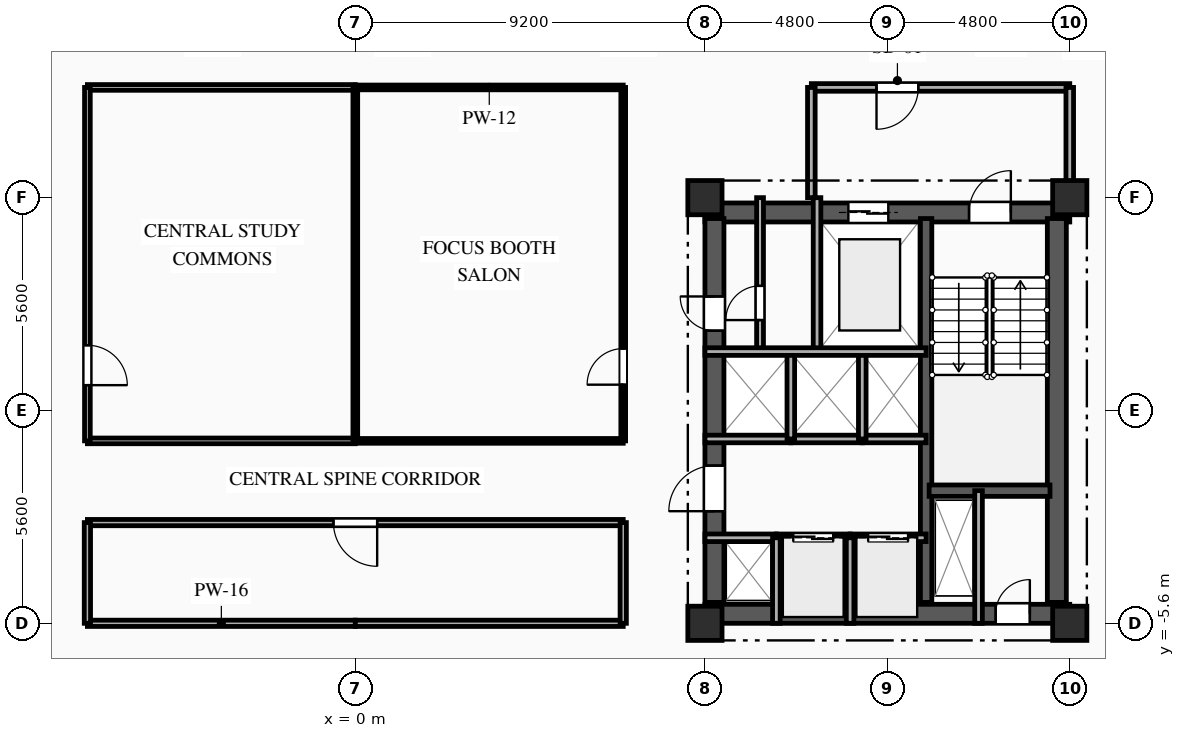
"""IFC4 building model, lengths in metres.
Left out: names, types, materials, properties, quantities, classifications, styles, units other than length and angle.
Written with IfcOpenShell. Run it as: python <this file> out.ifc"""

import sys

from ifc_helpers import new_model, si_unit, direction, frame, frame_2d, origin, origin_2d, place, context, subcontext, project, spatial, rectangle, extrude, element, fill, save


model = new_model("IFC4")
c1 = context("Model", 3, precision=1e-05, world=origin(), true_north=direction((0.0, 1.0)))
c2 = subcontext(c1, "Body", "Model", "MODEL_VIEW")
j1 = project(units=[si_unit("LENGTHUNIT", "METRE"), si_unit("PLANEANGLEUNIT", "RADIAN")], contexts=[c1])
p1 = place(None, origin())
s1 = spatial("IfcSite", under=j1, at=p1, CompositionType="ELEMENT")
p2 = place(p1, origin())
s2 = spatial("IfcBuilding", under=s1, at=p2, CompositionType="ELEMENT")
p3 = place(p2, frame((0.0, 0.0, 137.7)))
s3 = spatial("IfcBuildingStorey", under=s2, at=p3, CompositionType="ELEMENT", Elevation=137.7)
for number, where, z_axis, x_axis in (
    (1, (9.2, -5.6, 0.0), (0.0, 0.0, 1.0), (1.0, 0.0, 0.0)),
    (2, (9.2, 5.6, 0.0), (0.0, 0.0, 1.0), (1.0, 0.0, 0.0)),
    (3, (18.8, -5.6, 0.0), (0.0, 0.0, 1.0), (1.0, 0.0, 0.0)),
    (4, (18.8, 5.6, 0.0), (0.0, 0.0, 1.0), (1.0, 0.0, 0.0)),
):
    element("IfcColumn", number, at=place(p3, frame(where, z_axis=z_axis, x_axis=x_axis)), inside=s3, PredefinedType="COLUMN", context=c2, shape_type="SweptSolid", body=[
        extrude(rectangle(XDim=0.9, YDim=0.9, at=origin_2d()), origin(), (0.0, 0.0, 1.0), 3.35),
    ])
p4 = place(p3, frame((9.2, 5.21, 0.0), z_axis=(0.0, 0.0, 1.0), x_axis=(1.0, 0.0, 0.0)))
e5 = element("IfcWall", 5, at=p4, inside=s3, PredefinedType="SHEAR", context=c2, shape_type="SweptSolid", body=[
    extrude(rectangle(XDim=9.6, YDim=0.5, at=frame_2d((4.8, 0.0))), origin(), (0.0, 0.0, 1.0), 3.04),
])
p5 = place(p4, frame((6.95, 0.0, 0.0)))
e6 = element("IfcOpeningElement", 6, at=p5, cuts=e5, PredefinedType="OPENING", context=c2, shape_type="SweptSolid", body=[
    extrude(rectangle(XDim=1.1, YDim=2.15, at=frame_2d((0.55, 1.075))), frame((0.0, 0.26, 0.0), z_axis=(0.0, -1.0, 0.0), x_axis=(1.0, 0.0, 0.0)), (0.0, 0.0, 1.0), 0.52),
])
p6 = place(p4, frame((3.775, 0.0, 0.0)))
e7 = element("IfcOpeningElement", 7, at=p6, cuts=e5, PredefinedType="OPENING", context=c2, shape_type="SweptSolid", body=[
    extrude(rectangle(XDim=1.05, YDim=2.1, at=frame_2d((0.525, 1.05))), frame((0.0, 0.26, 0.0), z_axis=(0.0, -1.0, 0.0), x_axis=(1.0, 0.0, 0.0)), (0.0, 0.0, 1.0), 0.52),
])
p7 = place(p3, frame((9.2, -5.35, 0.0), z_axis=(0.0, 0.0, 1.0), x_axis=(1.0, 0.0, 0.0)))
e8 = element("IfcWall", 8, at=p7, inside=s3, PredefinedType="SHEAR", context=c2, shape_type="SweptSolid", body=[
    extrude(rectangle(XDim=9.6, YDim=0.5, at=frame_2d((4.8, 0.0))), origin(), (0.0, 0.0, 1.0), 3.04),
])
p8 = place(p7, frame((7.65, 0.0, 0.0)))
e9 = element("IfcOpeningElement", 9, at=p8, cuts=e8, PredefinedType="OPENING", context=c2, shape_type="SweptSolid", body=[
    extrude(rectangle(XDim=0.9, YDim=2.1, at=frame_2d((0.45, 1.05))), frame((0.0, 0.26, 0.0), z_axis=(0.0, -1.0, 0.0), x_axis=(1.0, 0.0, 0.0)), (0.0, 0.0, 1.0), 0.52),
])
p9 = place(p3, frame((9.45, -5.05, 0.0), z_axis=(0.0, 0.0, 1.0), x_axis=(0.0, 1.0, 0.0)))
e10 = element("IfcWall", 10, at=p9, inside=s3, PredefinedType="SHEAR", context=c2, shape_type="SweptSolid", body=[
    extrude(rectangle(XDim=10.1, YDim=0.5, at=frame_2d((5.05, 0.0))), origin(), (0.0, 0.0, 1.0), 3.04),
])
p10 = place(p9, frame((7.15, 0.0, 0.0)))
e11 = element("IfcOpeningElement", 11, at=p10, cuts=e10, PredefinedType="OPENING", context=c2, shape_type="SweptSolid", body=[
    extrude(rectangle(XDim=0.9, YDim=2.1, at=frame_2d((0.45, 1.05))), frame((0.0, 0.26, 0.0), z_axis=(0.0, -1.0, 0.0), x_axis=(1.0, 0.0, 0.0)), (0.0, 0.0, 1.0), 0.52),
])
p11 = place(p9, frame((2.4, 0.0, 0.0)))
e12 = element("IfcOpeningElement", 12, at=p11, cuts=e10, PredefinedType="OPENING", context=c2, shape_type="SweptSolid", body=[
    extrude(rectangle(XDim=1.2, YDim=2.15, at=frame_2d((0.6, 1.075))), frame((0.0, 0.26, 0.0), z_axis=(0.0, -1.0, 0.0), x_axis=(1.0, 0.0, 0.0)), (0.0, 0.0, 1.0), 0.52),
])
p12 = place(p3, frame((18.46, -5.05, 0.0), z_axis=(0.0, 0.0, 1.0), x_axis=(0.0, 1.0, 0.0)))
e13 = element("IfcWall", 13, at=p12, inside=s3, PredefinedType="SHEAR", context=c2, shape_type="SweptSolid", body=[
    extrude(rectangle(XDim=10.1, YDim=0.5, at=frame_2d((5.05, 0.0))), origin(), (0.0, 0.0, 1.0), 3.04),
])
p13 = place(p3, frame((15.02, -5.05, 0.0), z_axis=(0.0, 0.0, 1.0), x_axis=(0.0, 1.0, 0.0)))
e14 = element("IfcWall", 14, at=p13, inside=s3, PredefinedType="SHEAR", context=c2, shape_type="SweptSolid", body=[
    extrude(rectangle(XDim=10.1, YDim=0.3, at=frame_2d((5.05, 0.0))), origin(), (0.0, 0.0, 1.0), 3.04),
])
p14 = place(p3, frame((15.1, -2.11, 0.0), z_axis=(0.0, 0.0, 1.0), x_axis=(1.0, 0.0, 0.0)))
e15 = element("IfcWall", 15, at=p14, inside=s3, PredefinedType="SHEAR", context=c2, shape_type="SweptSolid", body=[
    extrude(rectangle(XDim=3.18, YDim=0.3, at=frame_2d((1.59, 0.0))), origin(), (0.0, 0.0, 1.0), 3.04),
])
p15 = place(p3, frame((16.4, -2.11, 0.0), z_axis=(0.0, 0.0, 1.0), x_axis=(0.0, -1.0, 0.0)))
e16 = element("IfcWall", 16, at=p15, inside=s3, PredefinedType="PARTITIONING", context=c2, shape_type="SweptSolid", body=[
    extrude(rectangle(XDim=3.49, YDim=0.2, at=frame_2d((1.745, 0.0))), origin(), (0.0, 0.0, 1.0), 3.04),
])
p16 = place(p3, frame((12.15, 5.6, 0.0), z_axis=(0.0, 0.0, 1.0), x_axis=(0.0, -1.0, 0.0)))
e17 = element("IfcWall", 17, at=p16, inside=s3, PredefinedType="PARTITIONING", context=c2, shape_type="SweptSolid", body=[
    extrude(rectangle(XDim=4.05, YDim=0.2, at=frame_2d((2.025, 0.0))), origin(), (0.0, 0.0, 1.0), 3.04),
])
p17 = place(p3, frame((18.8, 8.5, 0.0), z_axis=(0.0, 0.0, 1.0), x_axis=(-1.0, 0.0, 0.0)))
e18 = element("IfcWall", 18, at=p17, inside=s3, PredefinedType="PARTITIONING", context=c2, shape_type="SweptSolid", body=[
    extrude(rectangle(XDim=6.8, YDim=0.2, at=frame_2d((3.4, 0.0))), origin(), (0.0, 0.0, 1.0), 3.04),
])
p18 = place(p17, frame((3.985, 0.0, 0.0)))
e19 = element("IfcOpeningElement", 19, at=p18, cuts=e18, PredefinedType="OPENING", context=c2, shape_type="SweptSolid", body=[
    extrude(rectangle(XDim=1.1, YDim=2.15, at=frame_2d((0.55, 1.075))), frame((0.0, 0.11, 0.0), z_axis=(0.0, -1.0, 0.0), x_axis=(1.0, 0.0, 0.0)), (0.0, 0.0, 1.0), 0.22),
])
p19 = place(p3, frame((18.8, 5.6, 0.0), z_axis=(0.0, 0.0, 1.0), x_axis=(0.0, 1.0, 0.0)))
e20 = element("IfcWall", 20, at=p19, inside=s3, PredefinedType="PARTITIONING", context=c2, shape_type="SweptSolid", body=[
    extrude(rectangle(XDim=2.9, YDim=0.2, at=frame_2d((1.45, 0.0))), origin(), (0.0, 0.0, 1.0), 2.525),
])
p20 = place(p3, frame((12.0, 8.5, 0.0), z_axis=(0.0, 0.0, 1.0), x_axis=(0.0, -1.0, 0.0)))
e21 = element("IfcWall", 21, at=p20, inside=s3, PredefinedType="PARTITIONING", context=c2, shape_type="SweptSolid", body=[
    extrude(rectangle(XDim=2.9, YDim=0.2, at=frame_2d((1.45, 0.0))), origin(), (0.0, 0.0, 1.0), 3.04),
])
p21 = place(p3, frame((10.65, 1.55, 0.0), z_axis=(0.0, 0.0, 1.0), x_axis=(0.0, 1.0, 0.0)))
e22 = element("IfcWall", 22, at=p21, inside=s3, PredefinedType="PARTITIONING", context=c2, shape_type="SweptSolid", body=[
    extrude(rectangle(XDim=4.05, YDim=0.18, at=frame_2d((2.025, 0.0))), origin(), (0.0, 0.0, 1.0), 3.04),
])
p22 = place(p21, frame((0.829, 0.0, 0.0)))
e23 = element("IfcOpeningElement", 23, at=p22, cuts=e22, PredefinedType="OPENING", context=c2, shape_type="SweptSolid", body=[
    extrude(rectangle(XDim=0.9, YDim=2.1, at=frame_2d((0.45, 1.05))), frame((0.0, 0.1, 0.0), z_axis=(0.0, -1.0, 0.0), x_axis=(1.0, 0.0, 0.0)), (0.0, 0.0, 1.0), 0.2),
])
p23 = place(p3, frame((9.2, -3.35, 0.0), z_axis=(0.0, 0.0, 1.0), x_axis=(1.0, 0.0, 0.0)))
e24 = element("IfcWall", 24, at=p23, inside=s3, PredefinedType="PARTITIONING", context=c2, shape_type="SweptSolid", body=[
    extrude(rectangle(XDim=1.88, YDim=0.2, at=frame_2d((0.94, 0.0))), origin(), (0.0, 0.0, 1.0), 2.755),
])
p24 = place(p3, frame((11.08, -3.35, 0.0), z_axis=(0.0, 0.0, 1.0), x_axis=(1.0, 0.0, 0.0)))
e25 = element("IfcWall", 25, at=p24, inside=s3, PredefinedType="PARTITIONING", context=c2, shape_type="SweptSolid", body=[
    extrude(rectangle(XDim=1.94, YDim=0.2, at=frame_2d((0.97, 0.0))), origin(), (0.0, 0.0, 1.0), 3.04),
])
p25 = place(p24, frame((0.445, 0.0, 0.0)))
e26 = element("IfcOpeningElement", 26, at=p25, cuts=e25, PredefinedType="OPENING", context=c2, shape_type="SweptSolid", body=[
    extrude(rectangle(XDim=1.05, YDim=2.1, at=frame_2d((0.525, 1.05))), frame((0.0, 0.11, 0.0), z_axis=(0.0, -1.0, 0.0), x_axis=(1.0, 0.0, 0.0)), (0.0, 0.0, 1.0), 0.22),
])
p26 = place(p3, frame((13.02, -3.35, 0.0), z_axis=(0.0, 0.0, 1.0), x_axis=(1.0, 0.0, 0.0)))
e27 = element("IfcWall", 27, at=p26, inside=s3, PredefinedType="PARTITIONING", context=c2, shape_type="SweptSolid", body=[
    extrude(rectangle(XDim=2.0, YDim=0.2, at=frame_2d((1.0, 0.0))), origin(), (0.0, 0.0, 1.0), 3.04),
])
p27 = place(p26, frame((0.475, 0.0, 0.0)))
e28 = element("IfcOpeningElement", 28, at=p27, cuts=e27, PredefinedType="OPENING", context=c2, shape_type="SweptSolid", body=[
    extrude(rectangle(XDim=1.05, YDim=2.1, at=frame_2d((0.525, 1.05))), frame((0.0, 0.11, 0.0), z_axis=(0.0, -1.0, 0.0), x_axis=(1.0, 0.0, 0.0)), (0.0, 0.0, 1.0), 0.22),
])
p28 = place(p3, frame((11.46, -0.75, 0.0), z_axis=(0.0, 0.0, 1.0), x_axis=(-1.0, 0.0, 0.0)))
e29 = element("IfcWall", 29, at=p28, inside=s3, PredefinedType="PARTITIONING", context=c2, shape_type="SweptSolid", body=[
    extrude(rectangle(XDim=2.26, YDim=0.2, at=frame_2d((1.13, 0.0))), origin(), (0.0, 0.0, 1.0), 3.04),
])
p29 = place(p3, frame((13.34, -0.75, 0.0), z_axis=(0.0, 0.0, 1.0), x_axis=(-1.0, 0.0, 0.0)))
e30 = element("IfcWall", 30, at=p29, inside=s3, PredefinedType="PARTITIONING", context=c2, shape_type="SweptSolid", body=[
    extrude(rectangle(XDim=1.88, YDim=0.2, at=frame_2d((0.94, 0.0))), origin(), (0.0, 0.0, 1.0), 3.04),
])
p30 = place(p3, frame((15.02, -0.75, 0.0), z_axis=(0.0, 0.0, 1.0), x_axis=(-1.0, 0.0, 0.0)))
e31 = element("IfcWall", 31, at=p30, inside=s3, PredefinedType="PARTITIONING", context=c2, shape_type="SweptSolid", body=[
    extrude(rectangle(XDim=1.68, YDim=0.2, at=frame_2d((0.84, 0.0))), origin(), (0.0, 0.0, 1.0), 3.04),
])
for number, where, z_axis, x_axis in (
    (32, (11.08, -5.6, 0.0), (0.0, 0.0, 1.0), (0.0, 1.0, 0.0)),
    (33, (13.02, -5.6, 0.0), (0.0, 0.0, 1.0), (0.0, 1.0, 0.0)),
):
    element("IfcWall", number, at=place(p3, frame(where, z_axis=z_axis, x_axis=x_axis)), inside=s3, PredefinedType="PARTITIONING", context=c2, shape_type="SweptSolid", body=[
        extrude(rectangle(XDim=2.25, YDim=0.2, at=frame_2d((1.125, 0.0))), origin(), (0.0, 0.0, 1.0), 3.04),
    ])
for number, where, z_axis, x_axis in (
    (34, (11.46, -0.75, 0.0), (0.0, 0.0, 1.0), (0.0, 1.0, 0.0)),
    (35, (13.34, -0.75, 0.0), (0.0, 0.0, 1.0), (0.0, 1.0, 0.0)),
):
    element("IfcWall", number, at=place(p3, frame(where, z_axis=z_axis, x_axis=x_axis)), inside=s3, PredefinedType="PARTITIONING", context=c2, shape_type="SweptSolid", body=[
        extrude(rectangle(XDim=2.3, YDim=0.2, at=frame_2d((1.15, 0.0))), origin(), (0.0, 0.0, 1.0), 3.04),
    ])
p31 = place(p3, frame((0.0, 8.5, 0.0), z_axis=(0.0, 0.0, 1.0), x_axis=(-1.0, 0.0, 0.0)))
e36 = element("IfcWall", 36, at=p31, inside=s3, PredefinedType="PARTITIONING", context=c2, shape_type="SweptSolid", body=[
    extrude(rectangle(XDim=7.05, YDim=0.15, at=frame_2d((3.525, 0.0))), origin(), (0.0, 0.0, 1.0), 3.04),
])
p32 = place(p3, frame((7.05, 8.5, 0.0), z_axis=(0.0, 0.0, 1.0), x_axis=(-1.0, 0.0, 0.0)))
e37 = element("IfcWall", 37, at=p32, inside=s3, PredefinedType="PARTITIONING", context=c2, shape_type="SweptSolid", body=[
    extrude(rectangle(XDim=7.05, YDim=0.125, at=frame_2d((3.525, 0.0))), origin(), (0.0, 0.0, 1.0), 3.04),
])
for number, where, z_axis, x_axis in (
    (38, (-7.05, -5.6, 0.0), (0.0, 0.0, 1.0), (1.0, 0.0, 0.0)),
    (39, (0.0, -5.6, 0.0), (0.0, 0.0, 1.0), (1.0, 0.0, 0.0)),
):
    element("IfcWall", number, at=place(p3, frame(where, z_axis=z_axis, x_axis=x_axis)), inside=s3, PredefinedType="PARTITIONING", context=c2, shape_type="SweptSolid", body=[
        extrude(rectangle(XDim=7.05, YDim=0.165, at=frame_2d((3.525, 0.0))), origin(), (0.0, 0.0, 1.0), 2.525),
    ])
p33 = place(p3, frame((-7.05, -0.8, 0.0), z_axis=(0.0, 0.0, 1.0), x_axis=(1.0, 0.0, 0.0)))
e40 = element("IfcWall", 40, at=p33, inside=s3, PredefinedType="PARTITIONING", context=c2, shape_type="SweptSolid", body=[
    extrude(rectangle(XDim=7.05, YDim=0.15, at=frame_2d((3.525, 0.0))), origin(), (0.0, 0.0, 1.0), 3.04),
])
p34 = place(p3, frame((0.0, -0.8, 0.0), z_axis=(0.0, 0.0, 1.0), x_axis=(1.0, 0.0, 0.0)))
e41 = element("IfcWall", 41, at=p34, inside=s3, PredefinedType="PARTITIONING", context=c2, shape_type="SweptSolid", body=[
    extrude(rectangle(XDim=7.05, YDim=0.125, at=frame_2d((3.525, 0.0))), origin(), (0.0, 0.0, 1.0), 3.04),
])
p35 = place(p3, frame((7.05, -2.95, 0.0), z_axis=(0.0, 0.0, 1.0), x_axis=(-1.0, 0.0, 0.0)))
e42 = element("IfcWall", 42, at=p35, inside=s3, PredefinedType="PARTITIONING", context=c2, shape_type="SweptSolid", body=[
    extrude(rectangle(XDim=14.1, YDim=0.165, at=frame_2d((7.05, 0.0))), origin(), (0.0, 0.0, 1.0), 3.04),
])
p36 = place(p35, frame((6.475, 0.0, 0.0)))
e43 = element("IfcOpeningElement", 43, at=p36, cuts=e42, PredefinedType="OPENING", context=c2, shape_type="SweptSolid", body=[
    extrude(rectangle(XDim=1.15, YDim=2.15, at=frame_2d((0.575, 1.075))), frame((0.0, 0.093, 0.0), z_axis=(0.0, -1.0, 0.0), x_axis=(1.0, 0.0, 0.0)), (0.0, 0.0, 1.0), 0.185),
])
p37 = place(p3, frame((-7.05, 8.5, 0.0), z_axis=(0.0, 0.0, 1.0), x_axis=(0.0, -1.0, 0.0)))
e44 = element("IfcWall", 44, at=p37, inside=s3, PredefinedType="PARTITIONING", context=c2, shape_type="SweptSolid", body=[
    extrude(rectangle(XDim=9.3, YDim=0.15, at=frame_2d((4.65, 0.0))), origin(), (0.0, 0.0, 1.0), 3.04),
])
p38 = place(p37, frame((6.784, 0.0, 0.0)))
e45 = element("IfcOpeningElement", 45, at=p38, cuts=e44, PredefinedType="OPENING", context=c2, shape_type="SweptSolid", body=[
    extrude(rectangle(XDim=1.05, YDim=2.15, at=frame_2d((0.525, 1.075))), frame((0.0, 0.085, 0.0), z_axis=(0.0, -1.0, 0.0), x_axis=(1.0, 0.0, 0.0)), (0.0, 0.0, 1.0), 0.17),
])
p39 = place(p3, frame((-7.05, -2.95, 0.0), z_axis=(0.0, 0.0, 1.0), x_axis=(0.0, -1.0, 0.0)))
e46 = element("IfcWall", 46, at=p39, inside=s3, PredefinedType="PARTITIONING", context=c2, shape_type="SweptSolid", body=[
    extrude(rectangle(XDim=2.65, YDim=0.165, at=frame_2d((1.325, 0.0))), origin(), (0.0, 0.0, 1.0), 3.04),
])
p40 = place(p3, frame((7.05, -0.8, 0.0), z_axis=(0.0, 0.0, 1.0), x_axis=(0.0, 1.0, 0.0)))
e47 = element("IfcWall", 47, at=p40, inside=s3, PredefinedType="PARTITIONING", context=c2, shape_type="SweptSolid", body=[
    extrude(rectangle(XDim=9.3, YDim=0.125, at=frame_2d((4.65, 0.0))), origin(), (0.0, 0.0, 1.0), 3.04),
])
p41 = place(p40, frame((1.479, 0.0, 0.0)))
e48 = element("IfcOpeningElement", 48, at=p41, cuts=e47, PredefinedType="OPENING", context=c2, shape_type="SweptSolid", body=[
    extrude(rectangle(XDim=0.95, YDim=2.1, at=frame_2d((0.475, 1.05))), frame((0.0, 0.073, 0.0), z_axis=(0.0, -1.0, 0.0), x_axis=(1.0, 0.0, 0.0)), (0.0, 0.0, 1.0), 0.145),
])
p42 = place(p3, frame((7.05, -5.6, 0.0), z_axis=(0.0, 0.0, 1.0), x_axis=(0.0, 1.0, 0.0)))
e49 = element("IfcWall", 49, at=p42, inside=s3, PredefinedType="PARTITIONING", context=c2, shape_type="SweptSolid", body=[
    extrude(rectangle(XDim=2.65, YDim=0.165, at=frame_2d((1.325, 0.0))), origin(), (0.0, 0.0, 1.0), 3.04),
])
p43 = place(p3, frame((0.0, 8.5, 0.0), z_axis=(0.0, 0.0, 1.0), x_axis=(0.0, -1.0, 0.0)))
e50 = element("IfcWall", 50, at=p43, inside=s3, PredefinedType="PARTITIONING", context=c2, shape_type="SweptSolid", body=[
    extrude(rectangle(XDim=9.3, YDim=0.125, at=frame_2d((4.65, 0.0))), origin(), (0.0, 0.0, 1.0), 3.04),
])
p44 = place(p3, frame((9.2, 1.55, 0.0), z_axis=(0.0, 0.0, 1.0), x_axis=(1.0, 0.0, 0.0)))
e51 = element("IfcWall", 51, at=p44, inside=s3, PredefinedType="PARTITIONING", context=c2, shape_type="SweptSolid", body=[
    extrude(rectangle(XDim=5.82, YDim=0.2, at=frame_2d((2.91, 0.0))), origin(), (0.0, 0.0, 1.0), 3.04),
])
p45 = place(p5, origin())
e52 = element("IfcDoor", 52, at=p45, inside=s3, OperationType="SINGLE_SWING_RIGHT", PredefinedType="DOOR", context=c2, shape_type="SweptSolid", body=[
    extrude(rectangle(XDim=1.1, YDim=2.15, at=frame_2d((0.55, 1.075))), frame((0.0, 0.025, 0.0), z_axis=(0.0, -1.0, 0.0), x_axis=(1.0, 0.0, 0.0)), (0.0, 0.0, 1.0), 0.05),
])
fill(e6, e52)
p46 = place(p6, origin())
e53 = element("IfcDoor", 53, at=p46, inside=s3, OperationType="DOUBLE_DOOR_SLIDING", PredefinedType="DOOR", context=c2, shape_type="SweptSolid", body=[
    extrude(rectangle(XDim=1.05, YDim=2.1, at=frame_2d((0.525, 1.05))), frame((0.0, 0.025, 0.0), z_axis=(0.0, -1.0, 0.0), x_axis=(1.0, 0.0, 0.0)), (0.0, 0.0, 1.0), 0.05),
])
fill(e7, e53)
p47 = place(p8, origin())
e54 = element("IfcDoor", 54, at=p47, inside=s3, OperationType="SINGLE_SWING_RIGHT", PredefinedType="DOOR", context=c2, shape_type="SweptSolid", body=[
    extrude(rectangle(XDim=0.9, YDim=2.1, at=frame_2d((0.45, 1.05))), frame((0.0, 0.025, 0.0), z_axis=(0.0, -1.0, 0.0), x_axis=(1.0, 0.0, 0.0)), (0.0, 0.0, 1.0), 0.05),
])
fill(e9, e54)
p48 = place(p18, origin())
e55 = element("IfcDoor", 55, at=p48, inside=s3, OperationType="SINGLE_SWING_RIGHT", PredefinedType="DOOR", context=c2, shape_type="SweptSolid", body=[
    extrude(rectangle(XDim=1.1, YDim=2.15, at=frame_2d((0.55, 1.075))), frame((0.0, 0.025, 0.0), z_axis=(0.0, -1.0, 0.0), x_axis=(1.0, 0.0, 0.0)), (0.0, 0.0, 1.0), 0.05),
])
fill(e19, e55)
p49 = place(p22, origin())
e56 = element("IfcDoor", 56, at=p49, inside=s3, OperationType="SINGLE_SWING_LEFT", PredefinedType="DOOR", context=c2, shape_type="SweptSolid", body=[
    extrude(rectangle(XDim=0.9, YDim=2.1, at=frame_2d((0.45, 1.05))), frame((0.0, 0.025, 0.0), z_axis=(0.0, -1.0, 0.0), x_axis=(1.0, 0.0, 0.0)), (0.0, 0.0, 1.0), 0.05),
])
fill(e23, e56)
p50 = place(p10, origin())
e57 = element("IfcDoor", 57, at=p50, inside=s3, OperationType="SINGLE_SWING_RIGHT", PredefinedType="DOOR", context=c2, shape_type="SweptSolid", body=[
    extrude(rectangle(XDim=0.9, YDim=2.1, at=frame_2d((0.45, 1.05))), frame((0.0, 0.025, 0.0), z_axis=(0.0, -1.0, 0.0), x_axis=(1.0, 0.0, 0.0)), (0.0, 0.0, 1.0), 0.05),
])
fill(e11, e57)
p51 = place(p25, origin())
e58 = element("IfcDoor", 58, at=p51, inside=s3, OperationType="DOUBLE_DOOR_SLIDING", PredefinedType="DOOR", context=c2, shape_type="SweptSolid", body=[
    extrude(rectangle(XDim=1.05, YDim=2.1, at=frame_2d((0.525, 1.05))), frame((0.0, 0.025, 0.0), z_axis=(0.0, -1.0, 0.0), x_axis=(1.0, 0.0, 0.0)), (0.0, 0.0, 1.0), 0.05),
])
fill(e26, e58)
p52 = place(p27, origin())
e59 = element("IfcDoor", 59, at=p52, inside=s3, OperationType="DOUBLE_DOOR_SLIDING", PredefinedType="DOOR", context=c2, shape_type="SweptSolid", body=[
    extrude(rectangle(XDim=1.05, YDim=2.1, at=frame_2d((0.525, 1.05))), frame((0.0, 0.025, 0.0), z_axis=(0.0, -1.0, 0.0), x_axis=(1.0, 0.0, 0.0)), (0.0, 0.0, 1.0), 0.05),
])
fill(e28, e59)
p53 = place(p11, origin())
e60 = element("IfcDoor", 60, at=p53, inside=s3, OperationType="SINGLE_SWING_LEFT", PredefinedType="DOOR", context=c2, shape_type="SweptSolid", body=[
    extrude(rectangle(XDim=1.2, YDim=2.15, at=frame_2d((0.6, 1.075))), frame((0.0, 0.025, 0.0), z_axis=(0.0, -1.0, 0.0), x_axis=(1.0, 0.0, 0.0)), (0.0, 0.0, 1.0), 0.05),
])
fill(e12, e60)
p54 = place(p36, origin())
e61 = element("IfcDoor", 61, at=p54, inside=s3, OperationType="SINGLE_SWING_LEFT", PredefinedType="DOOR", context=c2, shape_type="SweptSolid", body=[
    extrude(rectangle(XDim=1.15, YDim=2.15, at=frame_2d((0.575, 1.075))), frame((0.0, 0.025, 0.0), z_axis=(0.0, -1.0, 0.0), x_axis=(1.0, 0.0, 0.0)), (0.0, 0.0, 1.0), 0.05),
])
fill(e43, e61)
p55 = place(p38, origin())
e62 = element("IfcDoor", 62, at=p55, inside=s3, OperationType="SINGLE_SWING_RIGHT", PredefinedType="DOOR", context=c2, shape_type="SweptSolid", body=[
    extrude(rectangle(XDim=1.05, YDim=2.15, at=frame_2d((0.525, 1.075))), frame((0.0, 0.025, 0.0), z_axis=(0.0, -1.0, 0.0), x_axis=(1.0, 0.0, 0.0)), (0.0, 0.0, 1.0), 0.05),
])
fill(e45, e62)
p56 = place(p41, origin())
e63 = element("IfcDoor", 63, at=p56, inside=s3, OperationType="SINGLE_SWING_LEFT", PredefinedType="DOOR", context=c2, shape_type="SweptSolid", body=[
    extrude(rectangle(XDim=0.95, YDim=2.1, at=frame_2d((0.475, 1.05))), frame((0.0, 0.025, 0.0), z_axis=(0.0, -1.0, 0.0), x_axis=(1.0, 0.0, 0.0)), (0.0, 0.0, 1.0), 0.05),
])
fill(e48, e63)
save(model, sys.argv[1])
